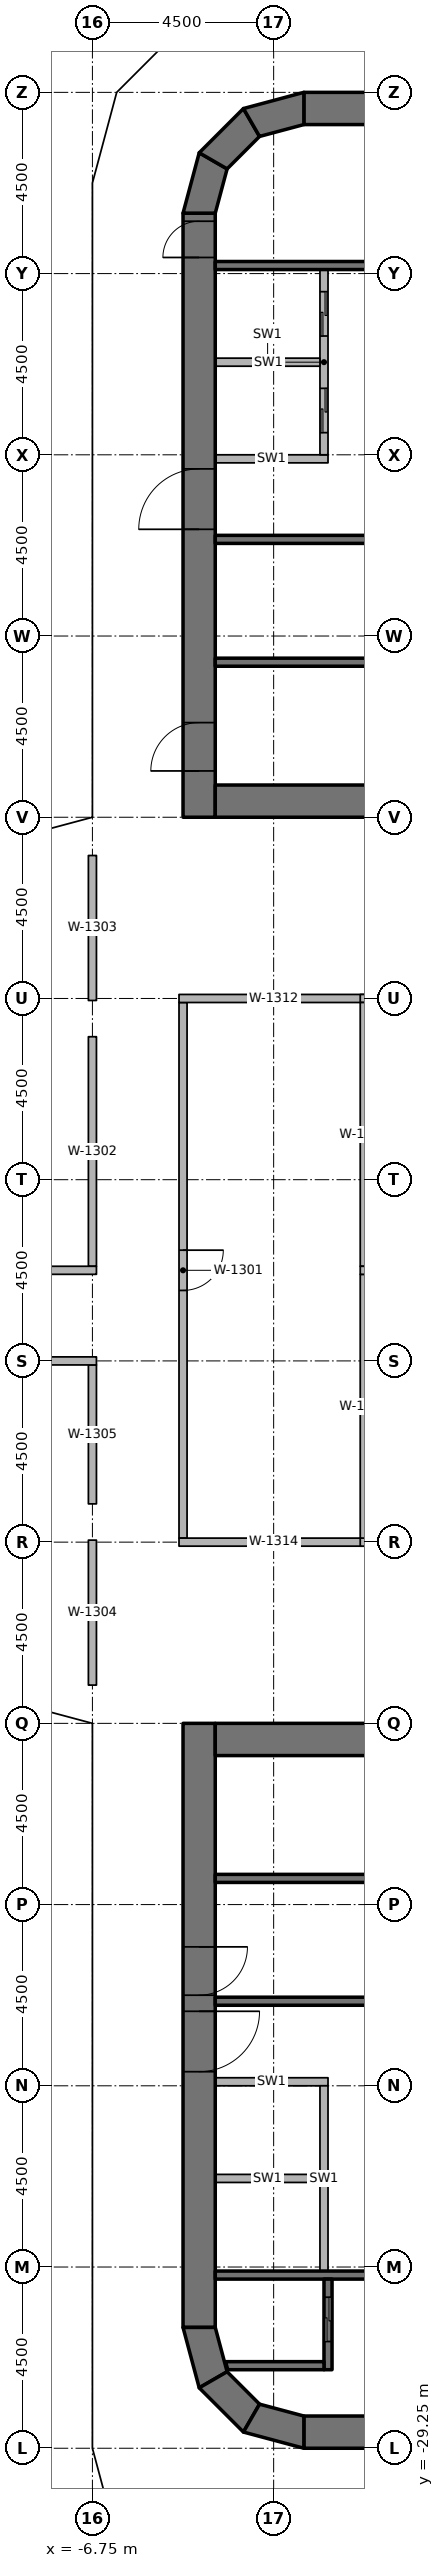
"""IFC4 building model, lengths in metres.
Left out: names, types, materials, properties, quantities, classifications, styles, units other than length and angle.
Written with IfcOpenShell. Run it as: python <this file> out.ifc"""

import sys

from ifc_helpers import new_model, si_unit, direction, frame, frame_2d, origin, origin_2d, place, context, subcontext, project, spatial, polyline, rectangle, outline, extrude, element, fill, save


model = new_model("IFC4")
c1 = context("Model", 3, precision=1e-05, world=origin(), true_north=direction((0.0, 1.0)))
c2 = subcontext(c1, "Body", "Model", "MODEL_VIEW")
j1 = project(units=[si_unit("LENGTHUNIT", "METRE"), si_unit("PLANEANGLEUNIT", "RADIAN")], contexts=[c1])
p1 = place(None, origin())
s1 = spatial("IfcSite", under=j1, at=p1, CompositionType="ELEMENT")
p2 = place(p1, origin())
s2 = spatial("IfcBuilding", under=s1, at=p2, CompositionType="ELEMENT")
p3 = place(p2, frame((0.0, 0.0, 132.2)))
s3 = spatial("IfcBuildingStorey", under=s2, at=p3, CompositionType="ELEMENT", Elevation=132.2)
for number, where, z_axis, x_axis in (
    (1, (-6.25, -26.9, 0.0), (0.0, 0.0, 1.0), (1.0, 0.0, 0.0)),
    (2, (-6.25, -24.65, 0.0), (0.0, 0.0, 1.0), (1.0, 0.0, 0.0)),
    (3, (-6.25, -20.25, 0.0), (0.0, 0.0, 1.0), (1.0, 0.0, 0.0)),
    (4, (-6.25, -15.75, 0.0), (0.0, 0.0, 1.0), (1.0, 0.0, 0.0)),
    (5, (-6.25, -10.75, 0.0), (0.0, 0.0, 1.0), (1.0, 0.0, 0.0)),
    (6, (-6.25, -6.25, 0.0), (0.0, 0.0, 1.0), (1.0, 0.0, 0.0)),
    (7, (-6.25, 6.25, 0.0), (0.0, 0.0, 1.0), (1.0, 0.0, 0.0)),
    (8, (-6.25, 10.75, 0.0), (0.0, 0.0, 1.0), (1.0, 0.0, 0.0)),
    (9, (-6.25, 15.75, 0.0), (0.0, 0.0, 1.0), (1.0, 0.0, 0.0)),
    (10, (-6.25, 20.25, 0.0), (0.0, 0.0, 1.0), (1.0, 0.0, 0.0)),
    (11, (-6.25, 24.65, 0.0), (0.0, 0.0, 1.0), (1.0, 0.0, 0.0)),
    (12, (-6.25, 26.7, 0.0), (0.0, 0.0, 1.0), (1.0, 0.0, 0.0)),
):
    element("IfcColumn", number, at=place(p3, frame(where, z_axis=z_axis, x_axis=x_axis)), inside=s3, PredefinedType="COLUMN", context=c2, shape_type="SweptSolid", body=[
        extrude(rectangle(XDim=0.9, YDim=0.9, at=origin_2d()), origin(), (0.0, 0.0, 1.0), 3.65),
    ])
p4 = place(p3, frame((-4.1, 11.25, 0.0), z_axis=(0.0, 0.0, 1.0), x_axis=(0.0, 1.0, 0.0)))
e13 = element("IfcWall", 13, at=p4, inside=s3, PredefinedType="SHEAR", context=c2, shape_type="SweptSolid", body=[
    extrude(rectangle(XDim=15.0, YDim=0.8, at=frame_2d((7.5, 0.0))), origin(), (0.0, 0.0, 1.0), 3.8),
])
p5 = place(p4, frame((7.15, 0.0, 0.0)))
e14 = element("IfcOpeningElement", 14, at=p5, cuts=e13, PredefinedType="OPENING", context=c2, shape_type="SweptSolid", body=[
    extrude(rectangle(XDim=1.5, YDim=2.3, at=frame_2d((0.75, 1.15))), frame((0.0, 0.41, 0.0), z_axis=(0.0, -1.0, 0.0), x_axis=(1.0, 0.0, 0.0)), (0.0, 0.0, 1.0), 0.82),
])
p6 = place(p4, frame((13.9, 0.0, 0.0)))
e15 = element("IfcOpeningElement", 15, at=p6, cuts=e13, PredefinedType="OPENING", context=c2, shape_type="SweptSolid", body=[
    extrude(rectangle(XDim=0.9, YDim=2.1, at=frame_2d((0.45, 1.05))), frame((0.0, 0.41, 0.0), z_axis=(0.0, -1.0, 0.0), x_axis=(1.0, 0.0, 0.0)), (0.0, 0.0, 1.0), 0.82),
])
p7 = place(p4, frame((1.15, 0.0, 0.0)))
e16 = element("IfcOpeningElement", 16, at=p7, cuts=e13, PredefinedType="OPENING", context=c2, shape_type="SweptSolid", body=[
    extrude(rectangle(XDim=1.2, YDim=2.1, at=frame_2d((0.6, 1.05))), frame((0.0, 0.41, 0.0), z_axis=(0.0, -1.0, 0.0), x_axis=(1.0, 0.0, 0.0)), (0.0, 0.0, 1.0), 0.82),
])
p8 = place(p3, frame((-3.7, 11.65, 0.0), z_axis=(0.0, 0.0, 1.0), x_axis=(1.0, 0.0, 0.0)))
e17 = element("IfcWall", 17, at=p8, inside=s3, PredefinedType="SHEAR", context=c2, shape_type="SweptSolid", body=[
    extrude(rectangle(XDim=7.4, YDim=0.8, at=frame_2d((3.7, 0.0))), origin(), (0.0, 0.0, 1.0), 3.8),
])
p9 = place(p3, frame((-1.5, 28.85, 0.0), z_axis=(0.0, 0.0, 1.0), x_axis=(1.0, 0.0, 0.0)))
e18 = element("IfcWall", 18, at=p9, inside=s3, PredefinedType="SHEAR", context=c2, shape_type="SweptSolid", body=[
    extrude(rectangle(XDim=3.0, YDim=0.8, at=frame_2d((1.5, 0.0))), origin(), (0.0, 0.0, 1.0), 3.8),
])
p10 = place(p3, origin())
e19 = element("IfcWall", 19, at=p10, inside=s3, PredefinedType="SHEAR", context=c2, shape_type="SweptSolid", body=[
    extrude(outline(polyline([(-4.5, 26.25), (-4.098, 27.75), (-3.405, 27.35), (-3.7, 26.25), (-4.5, 26.25)])), origin(), (0.0, 0.0, 1.0), 3.8),
])
p11 = place(p3, origin())
e20 = element("IfcWall", 20, at=p11, inside=s3, PredefinedType="SHEAR", context=c2, shape_type="SweptSolid", body=[
    extrude(outline(polyline([(-4.098, 27.75), (-3.0, 28.848), (-2.6, 28.155), (-3.405, 27.35), (-4.098, 27.75)])), origin(), (0.0, 0.0, 1.0), 3.8),
])
p12 = place(p3, origin())
e21 = element("IfcWall", 21, at=p12, inside=s3, PredefinedType="SHEAR", context=c2, shape_type="SweptSolid", body=[
    extrude(outline(polyline([(-3.0, 28.848), (-1.5, 29.25), (-1.5, 28.45), (-2.6, 28.155), (-3.0, 28.848)])), origin(), (0.0, 0.0, 1.0), 3.8),
])
p13 = place(p3, frame((-4.1, -11.25, 0.0), z_axis=(0.0, 0.0, 1.0), x_axis=(0.0, -1.0, 0.0)))
e22 = element("IfcWall", 22, at=p13, inside=s3, PredefinedType="SHEAR", context=c2, shape_type="SweptSolid", body=[
    extrude(rectangle(XDim=15.0, YDim=0.8, at=frame_2d((7.5, 0.0))), origin(), (0.0, 0.0, 1.0), 3.8),
])
p14 = place(p13, frame((7.15, 0.0, 0.0)))
e23 = element("IfcOpeningElement", 23, at=p14, cuts=e22, PredefinedType="OPENING", context=c2, shape_type="SweptSolid", body=[
    extrude(rectangle(XDim=1.5, YDim=2.3, at=frame_2d((0.75, 1.15))), frame((0.0, 0.41, 0.0), z_axis=(0.0, -1.0, 0.0), x_axis=(1.0, 0.0, 0.0)), (0.0, 0.0, 1.0), 0.82),
])
p15 = place(p13, frame((5.55, 0.0, 0.0)))
e24 = element("IfcOpeningElement", 24, at=p15, cuts=e22, PredefinedType="OPENING", context=c2, shape_type="SweptSolid", body=[
    extrude(rectangle(XDim=1.2, YDim=2.1, at=frame_2d((0.6, 1.05))), frame((0.0, 0.41, 0.0), z_axis=(0.0, -1.0, 0.0), x_axis=(1.0, 0.0, 0.0)), (0.0, 0.0, 1.0), 0.82),
])
p16 = place(p3, frame((-3.7, -11.65, 0.0), z_axis=(0.0, 0.0, 1.0), x_axis=(1.0, 0.0, 0.0)))
e25 = element("IfcWall", 25, at=p16, inside=s3, PredefinedType="SHEAR", context=c2, shape_type="SweptSolid", body=[
    extrude(rectangle(XDim=7.4, YDim=0.8, at=frame_2d((3.7, 0.0))), origin(), (0.0, 0.0, 1.0), 3.8),
])
p17 = place(p3, frame((-1.5, -28.85, 0.0), z_axis=(0.0, 0.0, 1.0), x_axis=(1.0, 0.0, 0.0)))
e26 = element("IfcWall", 26, at=p17, inside=s3, PredefinedType="SHEAR", context=c2, shape_type="SweptSolid", body=[
    extrude(rectangle(XDim=3.0, YDim=0.8, at=frame_2d((1.5, 0.0))), origin(), (0.0, 0.0, 1.0), 3.8),
])
p18 = place(p3, origin())
e27 = element("IfcWall", 27, at=p18, inside=s3, PredefinedType="SHEAR", context=c2, shape_type="SweptSolid", body=[
    extrude(outline(polyline([(-4.5, -26.25), (-4.098, -27.75), (-3.405, -27.35), (-3.7, -26.25), (-4.5, -26.25)])), origin(), (0.0, 0.0, 1.0), 3.8),
])
p19 = place(p3, origin())
e28 = element("IfcWall", 28, at=p19, inside=s3, PredefinedType="SHEAR", context=c2, shape_type="SweptSolid", body=[
    extrude(outline(polyline([(-4.098, -27.75), (-3.0, -28.848), (-2.6, -28.155), (-3.405, -27.35), (-4.098, -27.75)])), origin(), (0.0, 0.0, 1.0), 3.8),
])
p20 = place(p3, origin())
e29 = element("IfcWall", 29, at=p20, inside=s3, PredefinedType="SHEAR", context=c2, shape_type="SweptSolid", body=[
    extrude(outline(polyline([(-3.0, -28.848), (-1.5, -29.25), (-1.5, -28.45), (-2.6, -28.155), (-3.0, -28.848)])), origin(), (0.0, 0.0, 1.0), 3.8),
])
for number, where, z_axis, x_axis in (
    (30, (-3.7, 24.95, 0.0), (0.0, 0.0, 1.0), (1.0, 0.0, 0.0)),
    (31, (-3.7, 18.15, 0.0), (0.0, 0.0, 1.0), (1.0, 0.0, 0.0)),
    (32, (-3.7, 15.1, 0.0), (0.0, 0.0, 1.0), (1.0, 0.0, 0.0)),
):
    element("IfcWall", number, at=place(p3, frame(where, z_axis=z_axis, x_axis=x_axis)), inside=s3, PredefinedType="SHEAR", context=c2, shape_type="SweptSolid", body=[
        extrude(rectangle(XDim=7.4, YDim=0.2, at=frame_2d((3.7, 0.0))), origin(), (0.0, 0.0, 1.0), 3.65),
    ])
p21 = place(p3, frame((-3.7, 20.15, 0.0), z_axis=(0.0, 0.0, 1.0), x_axis=(1.0, 0.0, 0.0)))
e33 = element("IfcWall", 33, at=p21, inside=s3, PredefinedType="PARTITIONING", context=c2, shape_type="SweptSolid", body=[
    extrude(rectangle(XDim=2.8, YDim=0.2, at=frame_2d((1.4, 0.0))), origin(), (0.0, 0.0, 1.0), 3.65),
])
p22 = place(p3, frame((-1.0, 24.85, 0.0), z_axis=(0.0, 0.0, 1.0), x_axis=(0.0, -1.0, 0.0)))
e34 = element("IfcWall", 34, at=p22, inside=s3, PredefinedType="PARTITIONING", context=c2, shape_type="SweptSolid", body=[
    extrude(rectangle(XDim=4.6, YDim=0.2, at=frame_2d((2.3, 0.0))), origin(), (0.0, 0.0, 1.0), 3.65),
])
p23 = place(p22, frame((0.55, 0.0, 0.0)))
e35 = element("IfcOpeningElement", 35, at=p23, cuts=e34, PredefinedType="OPENING", context=c2, shape_type="SweptSolid", body=[
    extrude(rectangle(XDim=1.1, YDim=2.3, at=frame_2d((0.55, 1.15))), frame((0.0, 0.11, 0.0), z_axis=(0.0, -1.0, 0.0), x_axis=(1.0, 0.0, 0.0)), (0.0, 0.0, 1.0), 0.22),
])
p24 = place(p22, frame((2.95, 0.0, 0.0)))
e36 = element("IfcOpeningElement", 36, at=p24, cuts=e34, PredefinedType="OPENING", context=c2, shape_type="SweptSolid", body=[
    extrude(rectangle(XDim=1.1, YDim=2.3, at=frame_2d((0.55, 1.15))), frame((0.0, 0.11, 0.0), z_axis=(0.0, -1.0, 0.0), x_axis=(1.0, 0.0, 0.0)), (0.0, 0.0, 1.0), 0.22),
])
p25 = place(p3, frame((-3.7, 22.55, 0.0), z_axis=(0.0, 0.0, 1.0), x_axis=(1.0, 0.0, 0.0)))
e37 = element("IfcWall", 37, at=p25, inside=s3, PredefinedType="PARTITIONING", context=c2, shape_type="SweptSolid", body=[
    extrude(rectangle(XDim=2.6, YDim=0.2, at=frame_2d((1.3, 0.0))), origin(), (0.0, 0.0, 1.0), 3.65),
])
p26 = place(p3, frame((3.7, -24.95, 0.0), z_axis=(0.0, 0.0, 1.0), x_axis=(-1.0, 0.0, 0.0)))
e38 = element("IfcWall", 38, at=p26, inside=s3, PredefinedType="SHEAR", context=c2, shape_type="SweptSolid", body=[
    extrude(rectangle(XDim=7.4, YDim=0.2, at=frame_2d((3.7, 0.0))), origin(), (0.0, 0.0, 1.0), 3.65),
])
p27 = place(p3, frame((-0.9, -27.3, 0.0), z_axis=(0.0, 0.0, 1.0), x_axis=(0.0, 1.0, 0.0)))
e39 = element("IfcWall", 39, at=p27, inside=s3, PredefinedType="SHEAR", context=c2, shape_type="SweptSolid", body=[
    extrude(rectangle(XDim=2.25, YDim=0.2, at=frame_2d((1.125, 0.0))), origin(), (0.0, 0.0, 1.0), 3.65),
])
p28 = place(p27, frame((0.7, 0.0, 0.0)))
e40 = element("IfcOpeningElement", 40, at=p28, cuts=e39, PredefinedType="OPENING", context=c2, shape_type="SweptSolid", body=[
    extrude(rectangle(XDim=1.1, YDim=2.3, at=frame_2d((0.55, 1.15))), frame((0.0, 0.11, 0.0), z_axis=(0.0, -1.0, 0.0), x_axis=(1.0, 0.0, 0.0)), (0.0, 0.0, 1.0), 0.22),
])
p29 = place(p3, origin())
e41 = element("IfcWall", 41, at=p29, inside=s3, PredefinedType="SHEAR", context=c2, shape_type="SweptSolid", body=[
    extrude(outline(polyline([(-1.0, -27.1), (-3.444, -27.1), (-3.39, -27.3), (-1.0, -27.3), (-1.0, -27.1)])), origin(), (0.0, 0.0, 1.0), 3.65),
])
for number, where, z_axis, x_axis in (
    (42, (3.7, -18.15, 0.0), (0.0, 0.0, 1.0), (-1.0, 0.0, 0.0)),
    (43, (3.7, -15.1, 0.0), (0.0, 0.0, 1.0), (-1.0, 0.0, 0.0)),
):
    element("IfcWall", number, at=place(p3, frame(where, z_axis=z_axis, x_axis=x_axis)), inside=s3, PredefinedType="SHEAR", context=c2, shape_type="SweptSolid", body=[
        extrude(rectangle(XDim=7.4, YDim=0.2, at=frame_2d((3.7, 0.0))), origin(), (0.0, 0.0, 1.0), 3.65),
    ])
p30 = place(p3, frame((-0.9, -20.15, 0.0), z_axis=(0.0, 0.0, 1.0), x_axis=(-1.0, 0.0, 0.0)))
e44 = element("IfcWall", 44, at=p30, inside=s3, PredefinedType="PARTITIONING", context=c2, shape_type="SweptSolid", body=[
    extrude(rectangle(XDim=2.8, YDim=0.2, at=frame_2d((1.4, 0.0))), origin(), (0.0, 0.0, 1.0), 3.65),
])
p31 = place(p3, frame((-1.0, -24.85, 0.0), z_axis=(0.0, 0.0, 1.0), x_axis=(0.0, 1.0, 0.0)))
e45 = element("IfcWall", 45, at=p31, inside=s3, PredefinedType="PARTITIONING", context=c2, shape_type="SweptSolid", body=[
    extrude(rectangle(XDim=4.6, YDim=0.2, at=frame_2d((2.3, 0.0))), origin(), (0.0, 0.0, 1.0), 3.65),
])
p32 = place(p3, frame((-1.1, -22.55, 0.0), z_axis=(0.0, 0.0, 1.0), x_axis=(-1.0, 0.0, 0.0)))
e46 = element("IfcWall", 46, at=p32, inside=s3, PredefinedType="PARTITIONING", context=c2, shape_type="SweptSolid", body=[
    extrude(rectangle(XDim=2.6, YDim=0.2, at=frame_2d((1.3, 0.0))), origin(), (0.0, 0.0, 1.0), 3.65),
])
p33 = place(p3, frame((-4.5, 6.65, 0.0), z_axis=(0.0, 0.0, 1.0), x_axis=(0.0, -1.0, 0.0)))
e47 = element("IfcWall", 47, at=p33, inside=s3, PredefinedType="PARTITIONING", context=c2, shape_type="SweptSolid", body=[
    extrude(rectangle(XDim=13.3, YDim=0.2, at=frame_2d((6.65, 0.0))), origin(), (0.0, 0.0, 1.0), 2.738),
])
p34 = place(p33, frame((6.15, 0.0, 0.0)))
e48 = element("IfcOpeningElement", 48, at=p34, cuts=e47, PredefinedType="OPENING", context=c2, shape_type="SweptSolid", body=[
    extrude(rectangle(XDim=1.0, YDim=2.1, at=frame_2d((0.5, 1.05))), frame((0.0, 0.11, 0.0), z_axis=(0.0, -1.0, 0.0), x_axis=(1.0, 0.0, 0.0)), (0.0, 0.0, 1.0), 0.22),
])
p35 = place(p3, frame((-6.75, 0.1, 0.0), z_axis=(0.0, 0.0, 1.0), x_axis=(0.0, 1.0, 0.0)))
e49 = element("IfcWall", 49, at=p35, inside=s3, PredefinedType="PARTITIONING", context=c2, shape_type="SweptSolid", body=[
    extrude(rectangle(XDim=5.7, YDim=0.2, at=frame_2d((2.85, 0.0))), origin(), (0.0, 0.0, 1.0), 2.738),
])
for number, where, z_axis, x_axis in (
    (50, (-6.75, 6.7, 0.0), (0.0, 0.0, 1.0), (0.0, 1.0, 0.0)),
    (51, (-6.75, -10.3, 0.0), (0.0, 0.0, 1.0), (0.0, 1.0, 0.0)),
):
    element("IfcWall", number, at=place(p3, frame(where, z_axis=z_axis, x_axis=x_axis)), inside=s3, PredefinedType="PARTITIONING", context=c2, shape_type="SweptSolid", body=[
        extrude(rectangle(XDim=3.6, YDim=0.2, at=frame_2d((1.8, 0.0))), origin(), (0.0, 0.0, 1.0), 2.738),
    ])
p36 = place(p3, frame((-6.75, -5.8, 0.0), z_axis=(0.0, 0.0, 1.0), x_axis=(0.0, 1.0, 0.0)))
e52 = element("IfcWall", 52, at=p36, inside=s3, PredefinedType="PARTITIONING", context=c2, shape_type="SweptSolid", body=[
    extrude(rectangle(XDim=3.45, YDim=0.2, at=frame_2d((1.725, 0.0))), origin(), (0.0, 0.0, 1.0), 2.738),
])
for number, where, z_axis, x_axis in (
    (53, (-4.6, 6.75, 0.0), (0.0, 0.0, 1.0), (1.0, 0.0, 0.0)),
    (54, (-0.1, 6.75, 0.0), (0.0, 0.0, 1.0), (1.0, 0.0, 0.0)),
    (55, (-4.6, -6.75, 0.0), (0.0, 0.0, 1.0), (1.0, 0.0, 0.0)),
    (56, (-0.1, -6.75, 0.0), (0.0, 0.0, 1.0), (1.0, 0.0, 0.0)),
):
    element("IfcWall", number, at=place(p3, frame(where, z_axis=z_axis, x_axis=x_axis)), inside=s3, PredefinedType="PARTITIONING", context=c2, shape_type="SweptSolid", body=[
        extrude(rectangle(XDim=4.7, YDim=0.2, at=frame_2d((2.35, 0.0))), origin(), (0.0, 0.0, 1.0), 2.738),
    ])
for number, where, z_axis, x_axis in (
    (57, (0.0, 0.1, 0.0), (0.0, 0.0, 1.0), (0.0, 1.0, 0.0)),
    (58, (0.0, -6.65, 0.0), (0.0, 0.0, 1.0), (0.0, 1.0, 0.0)),
):
    element("IfcWall", number, at=place(p3, frame(where, z_axis=z_axis, x_axis=x_axis)), inside=s3, PredefinedType="PARTITIONING", context=c2, shape_type="SweptSolid", body=[
        extrude(rectangle(XDim=6.55, YDim=0.2, at=frame_2d((3.275, 0.0))), origin(), (0.0, 0.0, 1.0), 2.738),
    ])
p37 = place(p3, frame((-0.1, 0.0, 0.0), z_axis=(0.0, 0.0, 1.0), x_axis=(1.0, 0.0, 0.0)))
e59 = element("IfcWall", 59, at=p37, inside=s3, PredefinedType="PARTITIONING", context=c2, shape_type="SweptSolid", body=[
    extrude(rectangle(XDim=4.7, YDim=0.2, at=frame_2d((2.35, 0.0))), origin(), (0.0, 0.0, 1.0), 2.738),
])
p38 = place(p3, frame((-11.35, 0.0, 0.0), z_axis=(0.0, 0.0, 1.0), x_axis=(1.0, 0.0, 0.0)))
e60 = element("IfcWall", 60, at=p38, inside=s3, PredefinedType="PARTITIONING", context=c2, shape_type="SweptSolid", body=[
    extrude(rectangle(XDim=4.7, YDim=0.2, at=frame_2d((2.35, 0.0))), origin(), (0.0, 0.0, 1.0), 2.738),
])
p39 = place(p38, frame((1.85, 0.0, 0.0)))
e61 = element("IfcOpeningElement", 61, at=p39, cuts=e60, PredefinedType="OPENING", context=c2, shape_type="SweptSolid", body=[
    extrude(rectangle(XDim=1.0, YDim=2.1, at=frame_2d((0.5, 1.05))), frame((0.0, 0.11, 0.0), z_axis=(0.0, -1.0, 0.0), x_axis=(1.0, 0.0, 0.0)), (0.0, 0.0, 1.0), 0.22),
])
p40 = place(p3, frame((-6.65, -2.25, 0.0), z_axis=(0.0, 0.0, 1.0), x_axis=(-1.0, 0.0, 0.0)))
e62 = element("IfcWall", 62, at=p40, inside=s3, PredefinedType="PARTITIONING", context=c2, shape_type="SweptSolid", body=[
    extrude(rectangle(XDim=4.7, YDim=0.2, at=frame_2d((2.35, 0.0))), origin(), (0.0, 0.0, 1.0), 2.738),
])
p41 = place(p40, frame((1.85, 0.0, 0.0)))
e63 = element("IfcOpeningElement", 63, at=p41, cuts=e62, PredefinedType="OPENING", context=c2, shape_type="SweptSolid", body=[
    extrude(rectangle(XDim=1.0, YDim=2.1, at=frame_2d((0.5, 1.05))), frame((0.0, 0.11, 0.0), z_axis=(0.0, -1.0, 0.0), x_axis=(1.0, 0.0, 0.0)), (0.0, 0.0, 1.0), 0.22),
])
p42 = place(p5, origin())
e64 = element("IfcDoor", 64, at=p42, inside=s3, OperationType="DOUBLE_DOOR_SINGLE_SWING", PredefinedType="DOOR", context=c2, shape_type="SweptSolid", body=[
    extrude(rectangle(XDim=1.5, YDim=2.3, at=frame_2d((0.75, 1.15))), frame((0.0, 0.025, 0.0), z_axis=(0.0, -1.0, 0.0), x_axis=(1.0, 0.0, 0.0)), (0.0, 0.0, 1.0), 0.05),
])
fill(e14, e64)
p43 = place(p6, origin())
e65 = element("IfcDoor", 65, at=p43, inside=s3, OperationType="SINGLE_SWING_RIGHT", PredefinedType="DOOR", context=c2, shape_type="SweptSolid", body=[
    extrude(rectangle(XDim=0.9, YDim=2.1, at=frame_2d((0.45, 1.05))), frame((0.0, 0.025, 0.0), z_axis=(0.0, -1.0, 0.0), x_axis=(1.0, 0.0, 0.0)), (0.0, 0.0, 1.0), 0.05),
])
fill(e15, e65)
p44 = place(p7, origin())
e66 = element("IfcDoor", 66, at=p44, inside=s3, OperationType="SINGLE_SWING_RIGHT", PredefinedType="DOOR", context=c2, shape_type="SweptSolid", body=[
    extrude(rectangle(XDim=1.2, YDim=2.1, at=frame_2d((0.6, 1.05))), frame((0.0, 0.025, 0.0), z_axis=(0.0, -1.0, 0.0), x_axis=(1.0, 0.0, 0.0)), (0.0, 0.0, 1.0), 0.05),
])
fill(e16, e66)
p45 = place(p23, origin())
e67 = element("IfcDoor", 67, at=p45, inside=s3, OperationType="DOUBLE_DOOR_SLIDING", PredefinedType="DOOR", context=c2, shape_type="SweptSolid", body=[
    extrude(rectangle(XDim=1.1, YDim=2.3, at=frame_2d((0.55, 1.15))), frame((0.0, 0.025, 0.0), z_axis=(0.0, -1.0, 0.0), x_axis=(1.0, 0.0, 0.0)), (0.0, 0.0, 1.0), 0.05),
])
fill(e35, e67)
p46 = place(p24, origin())
e68 = element("IfcDoor", 68, at=p46, inside=s3, OperationType="DOUBLE_DOOR_SLIDING", PredefinedType="DOOR", context=c2, shape_type="SweptSolid", body=[
    extrude(rectangle(XDim=1.1, YDim=2.3, at=frame_2d((0.55, 1.15))), frame((0.0, 0.025, 0.0), z_axis=(0.0, -1.0, 0.0), x_axis=(1.0, 0.0, 0.0)), (0.0, 0.0, 1.0), 0.05),
])
fill(e36, e68)
p47 = place(p14, origin())
e69 = element("IfcDoor", 69, at=p47, inside=s3, OperationType="DOUBLE_DOOR_SINGLE_SWING", PredefinedType="DOOR", context=c2, shape_type="SweptSolid", body=[
    extrude(rectangle(XDim=1.5, YDim=2.3, at=frame_2d((0.75, 1.15))), frame((0.0, 0.025, 0.0), z_axis=(0.0, -1.0, 0.0), x_axis=(1.0, 0.0, 0.0)), (0.0, 0.0, 1.0), 0.05),
])
fill(e23, e69)
p48 = place(p15, origin())
e70 = element("IfcDoor", 70, at=p48, inside=s3, OperationType="SINGLE_SWING_RIGHT", PredefinedType="DOOR", context=c2, shape_type="SweptSolid", body=[
    extrude(rectangle(XDim=1.2, YDim=2.1, at=frame_2d((0.6, 1.05))), frame((0.0, 0.025, 0.0), z_axis=(0.0, -1.0, 0.0), x_axis=(1.0, 0.0, 0.0)), (0.0, 0.0, 1.0), 0.05),
])
fill(e24, e70)
p49 = place(p28, origin())
e71 = element("IfcDoor", 71, at=p49, inside=s3, OperationType="DOUBLE_DOOR_SLIDING", PredefinedType="DOOR", context=c2, shape_type="SweptSolid", body=[
    extrude(rectangle(XDim=1.1, YDim=2.3, at=frame_2d((0.55, 1.15))), frame((0.0, 0.025, 0.0), z_axis=(0.0, -1.0, 0.0), x_axis=(1.0, 0.0, 0.0)), (0.0, 0.0, 1.0), 0.05),
])
fill(e40, e71)
p50 = place(p34, origin())
e72 = element("IfcDoor", 72, at=p50, inside=s3, OperationType="SINGLE_SWING_RIGHT", PredefinedType="DOOR", context=c2, shape_type="SweptSolid", body=[
    extrude(rectangle(XDim=1.0, YDim=2.1, at=frame_2d((0.5, 1.05))), frame((0.0, 0.025, 0.0), z_axis=(0.0, -1.0, 0.0), x_axis=(1.0, 0.0, 0.0)), (0.0, 0.0, 1.0), 0.05),
])
fill(e48, e72)
save(model, sys.argv[1])
